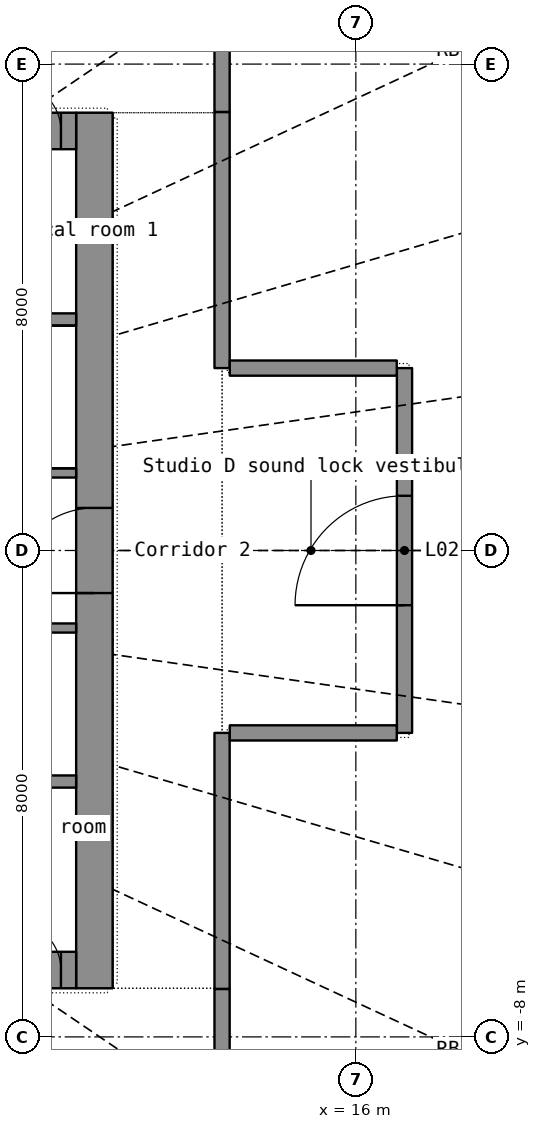
"""IFC4 building model, lengths in metres.
Left out: names, types, materials, properties, quantities, classifications, styles, units other than length and angle.
Written with IfcOpenShell. Run it as: python <this file> out.ifc"""

import sys

from ifc_helpers import new_model, si_unit, direction, frame, frame_2d, origin, place, context, subcontext, project, spatial, rectangle, extrude, element, fill, save


model = new_model("IFC4")
c1 = context("Model", 3, precision=1e-05, world=origin(), true_north=direction((0.0, 1.0)))
c2 = subcontext(c1, "Body", "Model", "MODEL_VIEW")
j1 = project(units=[si_unit("LENGTHUNIT", "METRE"), si_unit("PLANEANGLEUNIT", "RADIAN")], contexts=[c1])
p1 = place(None, origin())
s1 = spatial("IfcSite", under=j1, at=p1, CompositionType="ELEMENT")
p2 = place(p1, origin())
s2 = spatial("IfcBuilding", under=s1, at=p2, CompositionType="ELEMENT")
p3 = place(p2, frame((0.0, 0.0, 13.5)))
s3 = spatial("IfcBuildingStorey", under=s2, at=p3, CompositionType="ELEMENT", Elevation=13.5)
p4 = place(p3, frame((11.7, -7.2, 0.0), z_axis=(0.0, 0.0, 1.0), x_axis=(0.0, 1.0, 0.0)))
e1 = element("IfcWall", 1, at=p4, inside=s3, PredefinedType="SHEAR", context=c2, shape_type="SweptSolid", body=[
    extrude(rectangle(XDim=14.4, YDim=0.6, at=frame_2d((7.2, 0.0))), origin(), (0.0, 0.0, 1.0), 6.1),
])
p5 = place(p4, frame((6.5, 0.0, 0.0)))
e2 = element("IfcOpeningElement", 2, at=p5, cuts=e1, PredefinedType="OPENING", context=c2, shape_type="SweptSolid", body=[
    extrude(rectangle(XDim=1.4, YDim=2.2, at=frame_2d((0.7, 1.1))), frame((0.0, 0.31, 0.0), z_axis=(0.0, -1.0, 0.0), x_axis=(1.0, 0.0, 0.0)), (0.0, 0.0, 1.0), 0.62),
])
p6 = place(p3, frame((-11.4, -6.9, 0.0), z_axis=(0.0, 0.0, 1.0), x_axis=(1.0, 0.0, 0.0)))
e3 = element("IfcWall", 3, at=p6, inside=s3, PredefinedType="SHEAR", context=c2, shape_type="SweptSolid", body=[
    extrude(rectangle(XDim=22.8, YDim=0.6, at=frame_2d((11.4, 0.0))), origin(), (0.0, 0.0, 1.0), 6.1),
])
p7 = place(p6, frame((1.85, 0.0, 0.0)))
e4 = element("IfcOpeningElement", 4, at=p7, cuts=e3, PredefinedType="OPENING", context=c2, shape_type="SweptSolid", body=[
    extrude(rectangle(XDim=1.1, YDim=2.2, at=frame_2d((0.55, 1.1))), frame((0.0, 0.31, 0.0), z_axis=(0.0, -1.0, 0.0), x_axis=(1.0, 0.0, 0.0)), (0.0, 0.0, 1.0), 0.62),
])
p8 = place(p6, frame((3.85, 0.0, 0.0)))
e5 = element("IfcOpeningElement", 5, at=p8, cuts=e3, PredefinedType="OPENING", context=c2, shape_type="SweptSolid", body=[
    extrude(rectangle(XDim=1.1, YDim=2.2, at=frame_2d((0.55, 1.1))), frame((0.0, 0.31, 0.0), z_axis=(0.0, -1.0, 0.0), x_axis=(1.0, 0.0, 0.0)), (0.0, 0.0, 1.0), 0.62),
])
p9 = place(p6, frame((5.85, 0.0, 0.0)))
e6 = element("IfcOpeningElement", 6, at=p9, cuts=e3, PredefinedType="OPENING", context=c2, shape_type="SweptSolid", body=[
    extrude(rectangle(XDim=1.1, YDim=2.2, at=frame_2d((0.55, 1.1))), frame((0.0, 0.31, 0.0), z_axis=(0.0, -1.0, 0.0), x_axis=(1.0, 0.0, 0.0)), (0.0, 0.0, 1.0), 0.62),
])
p10 = place(p6, frame((7.85, 0.0, 0.0)))
e7 = element("IfcOpeningElement", 7, at=p10, cuts=e3, PredefinedType="OPENING", context=c2, shape_type="SweptSolid", body=[
    extrude(rectangle(XDim=1.1, YDim=2.2, at=frame_2d((0.55, 1.1))), frame((0.0, 0.31, 0.0), z_axis=(0.0, -1.0, 0.0), x_axis=(1.0, 0.0, 0.0)), (0.0, 0.0, 1.0), 0.62),
])
p11 = place(p6, frame((9.85, 0.0, 0.0)))
e8 = element("IfcOpeningElement", 8, at=p11, cuts=e3, PredefinedType="OPENING", context=c2, shape_type="SweptSolid", body=[
    extrude(rectangle(XDim=1.1, YDim=2.2, at=frame_2d((0.55, 1.1))), frame((0.0, 0.31, 0.0), z_axis=(0.0, -1.0, 0.0), x_axis=(1.0, 0.0, 0.0)), (0.0, 0.0, 1.0), 0.62),
])
p12 = place(p6, frame((11.85, 0.0, 0.0)))
e9 = element("IfcOpeningElement", 9, at=p12, cuts=e3, PredefinedType="OPENING", context=c2, shape_type="SweptSolid", body=[
    extrude(rectangle(XDim=1.1, YDim=2.2, at=frame_2d((0.55, 1.1))), frame((0.0, 0.31, 0.0), z_axis=(0.0, -1.0, 0.0), x_axis=(1.0, 0.0, 0.0)), (0.0, 0.0, 1.0), 0.62),
])
p13 = place(p6, frame((13.85, 0.0, 0.0)))
e10 = element("IfcOpeningElement", 10, at=p13, cuts=e3, PredefinedType="OPENING", context=c2, shape_type="SweptSolid", body=[
    extrude(rectangle(XDim=1.1, YDim=2.2, at=frame_2d((0.55, 1.1))), frame((0.0, 0.31, 0.0), z_axis=(0.0, -1.0, 0.0), x_axis=(1.0, 0.0, 0.0)), (0.0, 0.0, 1.0), 0.62),
])
p14 = place(p6, frame((15.85, 0.0, 0.0)))
e11 = element("IfcOpeningElement", 11, at=p14, cuts=e3, PredefinedType="OPENING", context=c2, shape_type="SweptSolid", body=[
    extrude(rectangle(XDim=1.1, YDim=2.2, at=frame_2d((0.55, 1.1))), frame((0.0, 0.31, 0.0), z_axis=(0.0, -1.0, 0.0), x_axis=(1.0, 0.0, 0.0)), (0.0, 0.0, 1.0), 0.62),
])
p15 = place(p6, frame((19.85, 0.0, 0.0)))
e12 = element("IfcOpeningElement", 12, at=p15, cuts=e3, PredefinedType="OPENING", context=c2, shape_type="SweptSolid", body=[
    extrude(rectangle(XDim=1.1, YDim=2.2, at=frame_2d((0.55, 1.1))), frame((0.0, 0.31, 0.0), z_axis=(0.0, -1.0, 0.0), x_axis=(1.0, 0.0, 0.0)), (0.0, 0.0, 1.0), 0.62),
])
p16 = place(p6, frame((0.25, 0.0, 0.0)))
e13 = element("IfcOpeningElement", 13, at=p16, cuts=e3, PredefinedType="OPENING", context=c2, shape_type="SweptSolid", body=[
    extrude(rectangle(XDim=0.8, YDim=2.05, at=frame_2d((0.4, 1.025))), frame((0.0, 0.31, 0.0), z_axis=(0.0, -1.0, 0.0), x_axis=(1.0, 0.0, 0.0)), (0.0, 0.0, 1.0), 0.62),
])
p17 = place(p6, frame((21.75, 0.0, 0.0)))
e14 = element("IfcOpeningElement", 14, at=p17, cuts=e3, PredefinedType="OPENING", context=c2, shape_type="SweptSolid", body=[
    extrude(rectangle(XDim=0.8, YDim=2.05, at=frame_2d((0.4, 1.025))), frame((0.0, 0.31, 0.0), z_axis=(0.0, -1.0, 0.0), x_axis=(1.0, 0.0, 0.0)), (0.0, 0.0, 1.0), 0.62),
])
p18 = place(p3, frame((-11.4, 6.9, 0.0), z_axis=(0.0, 0.0, 1.0), x_axis=(1.0, 0.0, 0.0)))
e15 = element("IfcWall", 15, at=p18, inside=s3, PredefinedType="SHEAR", context=c2, shape_type="SweptSolid", body=[
    extrude(rectangle(XDim=22.8, YDim=0.6, at=frame_2d((11.4, 0.0))), origin(), (0.0, 0.0, 1.0), 6.1),
])
p19 = place(p18, frame((1.85, 0.0, 0.0)))
e16 = element("IfcOpeningElement", 16, at=p19, cuts=e15, PredefinedType="OPENING", context=c2, shape_type="SweptSolid", body=[
    extrude(rectangle(XDim=1.1, YDim=2.2, at=frame_2d((0.55, 1.1))), frame((0.0, 0.31, 0.0), z_axis=(0.0, -1.0, 0.0), x_axis=(1.0, 0.0, 0.0)), (0.0, 0.0, 1.0), 0.62),
])
p20 = place(p18, frame((9.95, 0.0, 0.0)))
e17 = element("IfcOpeningElement", 17, at=p20, cuts=e15, PredefinedType="OPENING", context=c2, shape_type="SweptSolid", body=[
    extrude(rectangle(XDim=0.9, YDim=2.1, at=frame_2d((0.45, 1.05))), frame((0.0, 0.31, 0.0), z_axis=(0.0, -1.0, 0.0), x_axis=(1.0, 0.0, 0.0)), (0.0, 0.0, 1.0), 0.62),
])
p21 = place(p18, frame((17.95, 0.0, 0.0)))
e18 = element("IfcOpeningElement", 18, at=p21, cuts=e15, PredefinedType="OPENING", context=c2, shape_type="SweptSolid", body=[
    extrude(rectangle(XDim=0.9, YDim=2.1, at=frame_2d((0.45, 1.05))), frame((0.0, 0.31, 0.0), z_axis=(0.0, -1.0, 0.0), x_axis=(1.0, 0.0, 0.0)), (0.0, 0.0, 1.0), 0.62),
])
p22 = place(p18, frame((0.25, 0.0, 0.0)))
e19 = element("IfcOpeningElement", 19, at=p22, cuts=e15, PredefinedType="OPENING", context=c2, shape_type="SweptSolid", body=[
    extrude(rectangle(XDim=0.8, YDim=2.05, at=frame_2d((0.4, 1.025))), frame((0.0, 0.31, 0.0), z_axis=(0.0, -1.0, 0.0), x_axis=(1.0, 0.0, 0.0)), (0.0, 0.0, 1.0), 0.62),
])
p23 = place(p18, frame((21.75, 0.0, 0.0)))
e20 = element("IfcOpeningElement", 20, at=p23, cuts=e15, PredefinedType="OPENING", context=c2, shape_type="SweptSolid", body=[
    extrude(rectangle(XDim=0.8, YDim=2.05, at=frame_2d((0.4, 1.025))), frame((0.0, 0.31, 0.0), z_axis=(0.0, -1.0, 0.0), x_axis=(1.0, 0.0, 0.0)), (0.0, 0.0, 1.0), 0.62),
])
for number, where, z_axis, x_axis in (
    (21, (-11.4, -3.8, 0.0), (0.0, 0.0, 1.0), (1.0, 0.0, 0.0)),
    (22, (-11.4, 3.8, 0.0), (0.0, 0.0, 1.0), (1.0, 0.0, 0.0)),
):
    element("IfcWall", number, at=place(p3, frame(where, z_axis=z_axis, x_axis=x_axis)), inside=s3, PredefinedType="SHEAR", context=c2, shape_type="SweptSolid", body=[
        extrude(rectangle(XDim=22.8, YDim=0.2, at=frame_2d((11.4, 0.0))), origin(), (0.0, 0.0, 1.0), 6.1),
    ])
p24 = place(p3, frame((3.0, -1.275, 0.0), z_axis=(0.0, 0.0, 1.0), x_axis=(1.0, 0.0, 0.0)))
e23 = element("IfcWall", 23, at=p24, inside=s3, PredefinedType="PARTITIONING", context=c2, shape_type="SweptSolid", body=[
    extrude(rectangle(XDim=8.4, YDim=0.15, at=frame_2d((4.2, 0.0))), origin(), (0.0, 0.0, 1.0), 6.1),
])
p25 = place(p24, frame((0.36, 0.0, 0.0)))
e24 = element("IfcOpeningElement", 24, at=p25, cuts=e23, PredefinedType="OPENING", context=c2, shape_type="SweptSolid", body=[
    extrude(rectangle(XDim=0.9, YDim=2.1, at=frame_2d((0.45, 1.05))), frame((0.0, 0.085, 0.0), z_axis=(0.0, -1.0, 0.0), x_axis=(1.0, 0.0, 0.0)), (0.0, 0.0, 1.0), 0.17),
])
p26 = place(p24, frame((2.56, 0.0, 0.0)))
e25 = element("IfcOpeningElement", 25, at=p26, cuts=e23, PredefinedType="OPENING", context=c2, shape_type="SweptSolid", body=[
    extrude(rectangle(XDim=0.85, YDim=2.1, at=frame_2d((0.425, 1.05))), frame((0.0, 0.085, 0.0), z_axis=(0.0, -1.0, 0.0), x_axis=(1.0, 0.0, 0.0)), (0.0, 0.0, 1.0), 0.17),
])
p27 = place(p24, frame((5.95, 0.0, 0.0)))
e26 = element("IfcOpeningElement", 26, at=p27, cuts=e23, PredefinedType="OPENING", context=c2, shape_type="SweptSolid", body=[
    extrude(rectangle(XDim=0.85, YDim=2.1, at=frame_2d((0.425, 1.05))), frame((0.0, 0.085, 0.0), z_axis=(0.0, -1.0, 0.0), x_axis=(1.0, 0.0, 0.0)), (0.0, 0.0, 1.0), 0.17),
])
p28 = place(p3, frame((3.0, 1.275, 0.0), z_axis=(0.0, 0.0, 1.0), x_axis=(1.0, 0.0, 0.0)))
e27 = element("IfcWall", 27, at=p28, inside=s3, PredefinedType="SHEAR", context=c2, shape_type="SweptSolid", body=[
    extrude(rectangle(XDim=8.4, YDim=0.15, at=frame_2d((4.2, 0.0))), origin(), (0.0, 0.0, 1.0), 6.1),
])
p29 = place(p28, frame((2.05, 0.0, 0.0)))
e28 = element("IfcOpeningElement", 28, at=p29, cuts=e27, PredefinedType="OPENING", context=c2, shape_type="SweptSolid", body=[
    extrude(rectangle(XDim=1.1, YDim=2.15, at=frame_2d((0.55, 1.075))), frame((0.0, 0.085, 0.0), z_axis=(0.0, -1.0, 0.0), x_axis=(1.0, 0.0, 0.0)), (0.0, 0.0, 1.0), 0.17),
])
p30 = place(p28, frame((0.45, 0.0, 0.0)))
e29 = element("IfcOpeningElement", 29, at=p30, cuts=e27, PredefinedType="OPENING", context=c2, shape_type="SweptSolid", body=[
    extrude(rectangle(XDim=0.9, YDim=2.1, at=frame_2d((0.45, 1.05))), frame((0.0, 0.085, 0.0), z_axis=(0.0, -1.0, 0.0), x_axis=(1.0, 0.0, 0.0)), (0.0, 0.0, 1.0), 0.17),
])
p31 = place(p3, frame((16.8, -3.0, 0.0), z_axis=(0.0, 0.0, 1.0), x_axis=(0.0, 1.0, 0.0)))
e30 = element("IfcWall", 30, at=p31, inside=s3, PredefinedType="PARTITIONING", context=c2, shape_type="SweptSolid", body=[
    extrude(rectangle(XDim=6.0, YDim=0.25, at=frame_2d((3.0, 0.0))), origin(), (0.0, 0.0, 1.0), 5.1),
])
p32 = place(p31, frame((2.1, 0.0, 0.0)))
e31 = element("IfcOpeningElement", 31, at=p32, cuts=e30, PredefinedType="OPENING", context=c2, shape_type="SweptSolid", body=[
    extrude(rectangle(XDim=1.8, YDim=2.4, at=frame_2d((0.9, 1.2))), frame((0.0, 0.135, 0.0), z_axis=(0.0, -1.0, 0.0), x_axis=(1.0, 0.0, 0.0)), (0.0, 0.0, 1.0), 0.27),
])
for number, where, z_axis, x_axis in (
    (32, (13.8, -7.212, 0.0), (0.0, 0.0, 1.0), (0.0, 1.0, 0.0)),
    (33, (13.8, 3.0, 0.0), (0.0, 0.0, 1.0), (0.0, 1.0, 0.0)),
):
    element("IfcWall", number, at=place(p3, frame(where, z_axis=z_axis, x_axis=x_axis)), inside=s3, PredefinedType="PARTITIONING", context=c2, shape_type="SweptSolid", body=[
        extrude(rectangle(XDim=4.212, YDim=0.25, at=frame_2d((2.106, 0.0))), origin(), (0.0, 0.0, 1.0), 5.1),
    ])
for number, where, z_axis, x_axis in (
    (34, (13.927, -3.0, 0.0), (0.0, 0.0, 1.0), (1.0, 0.0, 0.0)),
    (35, (16.673, 3.0, 0.0), (0.0, 0.0, 1.0), (-1.0, 0.0, 0.0)),
):
    element("IfcWall", number, at=place(p3, frame(where, z_axis=z_axis, x_axis=x_axis)), inside=s3, PredefinedType="PARTITIONING", context=c2, shape_type="SweptSolid", body=[
        extrude(rectangle(XDim=2.746, YDim=0.25, at=frame_2d((1.373, 0.0))), origin(), (0.0, 0.0, 1.0), 5.1),
    ])
for number, where, z_axis, x_axis in (
    (36, (13.8, -9.599, 0.0), (0.0, 0.0, 1.0), (0.0, 1.0, 0.0)),
    (37, (13.8, 7.213, 0.0), (0.0, 0.0, 1.0), (0.0, 1.0, 0.0)),
):
    element("IfcWall", number, at=place(p3, frame(where, z_axis=z_axis, x_axis=x_axis)), inside=s3, PredefinedType="PARTITIONING", context=c2, shape_type="SweptSolid", body=[
        extrude(rectangle(XDim=2.386, YDim=0.25, at=frame_2d((1.193, 0.0))), origin(), (0.0, 0.0, 1.0), 5.1),
    ])
p33 = place(p17, origin())
e38 = element("IfcDoor", 38, at=p33, inside=s3, OperationType="SINGLE_SWING_LEFT", PredefinedType="DOOR", context=c2, shape_type="SweptSolid", body=[
    extrude(rectangle(XDim=0.8, YDim=2.05, at=frame_2d((0.4, 1.025))), frame((0.0, 0.025, 0.0), z_axis=(0.0, -1.0, 0.0), x_axis=(1.0, 0.0, 0.0)), (0.0, 0.0, 1.0), 0.05),
])
fill(e14, e38)
p34 = place(p23, origin())
e39 = element("IfcDoor", 39, at=p34, inside=s3, OperationType="SINGLE_SWING_LEFT", PredefinedType="DOOR", context=c2, shape_type="SweptSolid", body=[
    extrude(rectangle(XDim=0.8, YDim=2.05, at=frame_2d((0.4, 1.025))), frame((0.0, 0.025, 0.0), z_axis=(0.0, -1.0, 0.0), x_axis=(1.0, 0.0, 0.0)), (0.0, 0.0, 1.0), 0.05),
])
fill(e20, e39)
p35 = place(p5, origin())
e40 = element("IfcDoor", 40, at=p35, inside=s3, OperationType="DOUBLE_DOOR_SINGLE_SWING", PredefinedType="DOOR", context=c2, shape_type="SweptSolid", body=[
    extrude(rectangle(XDim=1.4, YDim=2.2, at=frame_2d((0.7, 1.1))), frame((0.0, 0.025, 0.0), z_axis=(0.0, -1.0, 0.0), x_axis=(1.0, 0.0, 0.0)), (0.0, 0.0, 1.0), 0.05),
])
fill(e2, e40)
p36 = place(p32, origin())
e41 = element("IfcDoor", 41, at=p36, inside=s3, OperationType="DOUBLE_DOOR_SINGLE_SWING", PredefinedType="DOOR", context=c2, shape_type="SweptSolid", body=[
    extrude(rectangle(XDim=1.8, YDim=2.4, at=frame_2d((0.9, 1.2))), frame((0.0, 0.025, 0.0), z_axis=(0.0, -1.0, 0.0), x_axis=(1.0, 0.0, 0.0)), (0.0, 0.0, 1.0), 0.05),
])
fill(e31, e41)
save(model, sys.argv[1])
